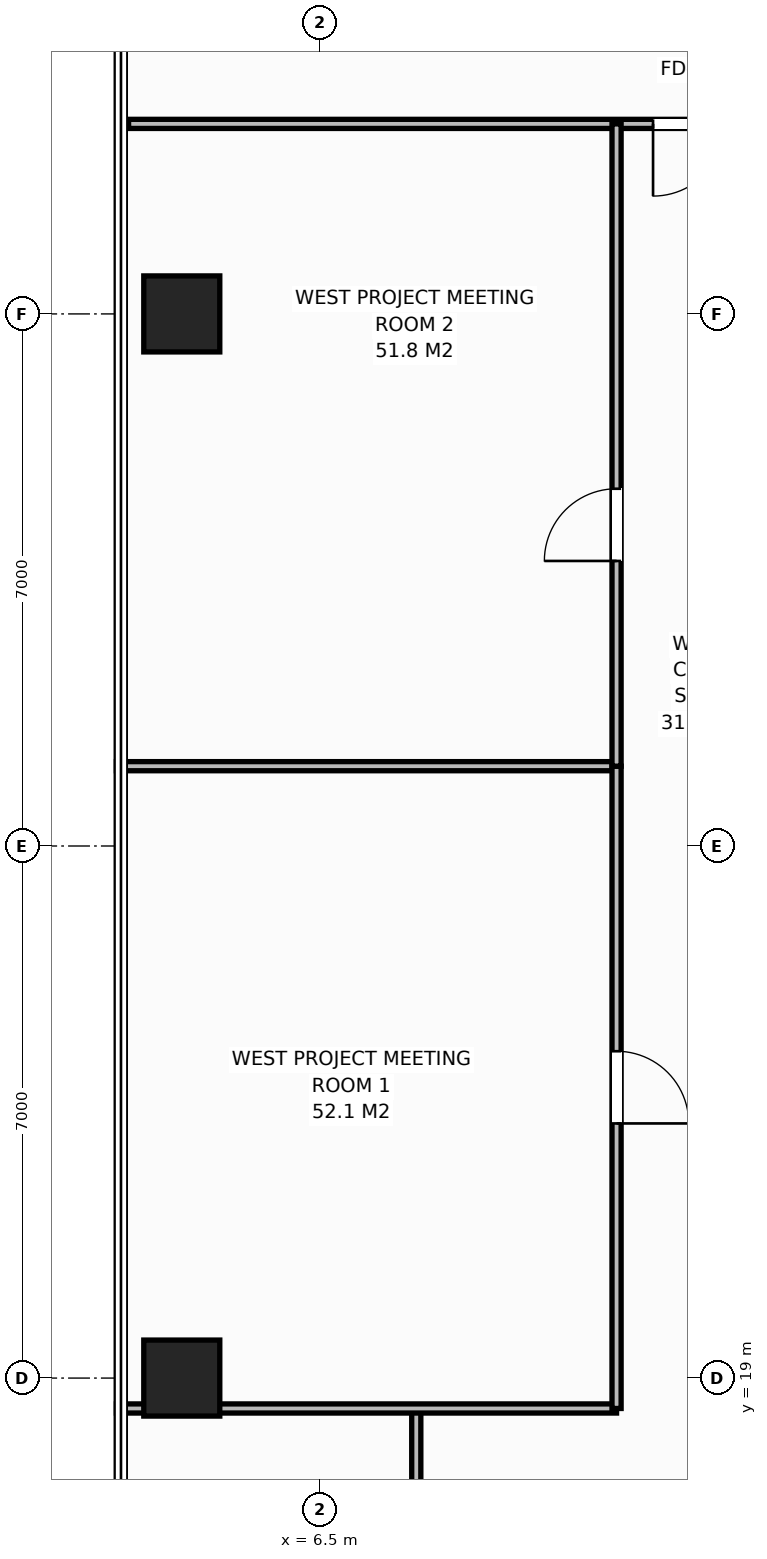
"""IFC4 building model, lengths in metres.
Left out: names, types, materials, properties, quantities, classifications, styles, units other than length and angle.
Written with IfcOpenShell. Run it as: python <this file> out.ifc"""

import sys

from ifc_helpers import new_model, si_unit, direction, frame, frame_2d, origin, origin_2d, place, context, subcontext, project, spatial, rectangle, extrude, element, fill, save


model = new_model("IFC4")
c1 = context("Model", 3, precision=1e-05, world=origin(), true_north=direction((0.0, 1.0)))
c2 = subcontext(c1, "Body", "Model", "MODEL_VIEW")
j1 = project(units=[si_unit("LENGTHUNIT", "METRE"), si_unit("PLANEANGLEUNIT", "RADIAN")], contexts=[c1])
p1 = place(None, origin())
s1 = spatial("IfcSite", under=j1, at=p1, CompositionType="ELEMENT")
p2 = place(p1, origin())
s2 = spatial("IfcBuilding", under=s1, at=p2, CompositionType="ELEMENT")
p3 = place(p2, frame((0.0, 0.0, 182.2)))
s3 = spatial("IfcBuildingStorey", under=s2, at=p3, CompositionType="ELEMENT", Elevation=182.2)
for number, where, z_axis, x_axis in (
    (1, (4.68, 19.0, 0.0), (0.0, 0.0, 1.0), (1.0, 0.0, 0.0)),
    (2, (4.68, 33.0, 0.0), (0.0, 0.0, 1.0), (1.0, 0.0, 0.0)),
):
    element("IfcColumn", number, at=place(p3, frame(where, z_axis=z_axis, x_axis=x_axis)), inside=s3, PredefinedType="COLUMN", context=c2, shape_type="SweptSolid", body=[
        extrude(rectangle(XDim=1.0, YDim=1.0, at=origin_2d()), origin(), (0.0, 0.0, 1.0), 3.8),
    ])
p4 = place(p3, frame((7.765, 16.5, 0.0), z_axis=(0.0, 0.0, 1.0), x_axis=(0.0, 1.0, 0.0)))
e3 = element("IfcWall", 3, at=p4, inside=s3, PredefinedType="PARTITIONING", context=c2, shape_type="SweptSolid", body=[
    extrude(rectangle(XDim=2.1, YDim=0.12, at=frame_2d((1.05, 0.0))), origin(), (0.0, 0.0, 1.0), 3.572),
])
p5 = place(p3, frame((3.98, 35.5, 0.0), z_axis=(0.0, 0.0, 1.0), x_axis=(1.0, 0.0, 0.0)))
e4 = element("IfcWall", 4, at=p5, inside=s3, PredefinedType="PARTITIONING", context=c2, shape_type="SweptSolid", body=[
    extrude(rectangle(XDim=9.62, YDim=0.12, at=frame_2d((4.81, 0.0))), origin(), (0.0, 0.0, 1.0), 3.572),
])
p6 = place(p5, frame((6.9, 0.0, 0.0)))
e5 = element("IfcOpeningElement", 5, at=p6, cuts=e4, PredefinedType="OPENING", context=c2, shape_type="SweptSolid", body=[
    extrude(rectangle(XDim=0.95, YDim=2.15, at=frame_2d((0.475, 1.075))), frame((0.0, 0.07, 0.0), z_axis=(0.0, -1.0, 0.0), x_axis=(1.0, 0.0, 0.0)), (0.0, 0.0, 1.0), 0.14),
])
for number, where, z_axis, x_axis in (
    (6, (3.82, 18.6, 0.0), (0.0, 0.0, 1.0), (1.0, 0.0, 0.0)),
    (7, (3.82, 27.05, 0.0), (0.0, 0.0, 1.0), (1.0, 0.0, 0.0)),
):
    element("IfcWall", number, at=place(p3, frame(where, z_axis=z_axis, x_axis=x_axis)), inside=s3, PredefinedType="PARTITIONING", context=c2, shape_type="SweptSolid", body=[
        extrude(rectangle(XDim=6.58, YDim=0.12, at=frame_2d((3.29, 0.0))), origin(), (0.0, 0.0, 1.0), 3.572),
    ])
p7 = place(p3, frame((10.4, 18.6, 0.0), z_axis=(0.0, 0.0, 1.0), x_axis=(0.0, 1.0, 0.0)))
e8 = element("IfcWall", 8, at=p7, inside=s3, PredefinedType="PARTITIONING", context=c2, shape_type="SweptSolid", body=[
    extrude(rectangle(XDim=8.45, YDim=0.12, at=frame_2d((4.225, 0.0))), origin(), (0.0, 0.0, 1.0), 3.572),
])
p8 = place(p7, frame((3.75, 0.0, 0.0)))
e9 = element("IfcOpeningElement", 9, at=p8, cuts=e8, PredefinedType="OPENING", context=c2, shape_type="SweptSolid", body=[
    extrude(rectangle(XDim=0.95, YDim=2.15, at=frame_2d((0.475, 1.075))), frame((0.0, 0.07, 0.0), z_axis=(0.0, -1.0, 0.0), x_axis=(1.0, 0.0, 0.0)), (0.0, 0.0, 1.0), 0.14),
])
p9 = place(p3, frame((10.4, 27.05, 0.0), z_axis=(0.0, 0.0, 1.0), x_axis=(0.0, 1.0, 0.0)))
e10 = element("IfcWall", 10, at=p9, inside=s3, PredefinedType="PARTITIONING", context=c2, shape_type="SweptSolid", body=[
    extrude(rectangle(XDim=8.45, YDim=0.12, at=frame_2d((4.225, 0.0))), origin(), (0.0, 0.0, 1.0), 3.572),
])
p10 = place(p9, frame((2.7, 0.0, 0.0)))
e11 = element("IfcOpeningElement", 11, at=p10, cuts=e10, PredefinedType="OPENING", context=c2, shape_type="SweptSolid", body=[
    extrude(rectangle(XDim=0.95, YDim=2.15, at=frame_2d((0.475, 1.075))), frame((0.0, 0.07, 0.0), z_axis=(0.0, -1.0, 0.0), x_axis=(1.0, 0.0, 0.0)), (0.0, 0.0, 1.0), 0.14),
])
p11 = place(p6, origin())
e12 = element("IfcDoor", 12, at=p11, inside=s3, OperationType="SINGLE_SWING_RIGHT", PredefinedType="DOOR", context=c2, shape_type="SweptSolid", body=[
    extrude(rectangle(XDim=0.95, YDim=2.15, at=frame_2d((0.475, 1.075))), frame((0.0, 0.025, 0.0), z_axis=(0.0, -1.0, 0.0), x_axis=(1.0, 0.0, 0.0)), (0.0, 0.0, 1.0), 0.05),
])
fill(e5, e12)
p12 = place(p8, origin())
e13 = element("IfcDoor", 13, at=p12, inside=s3, OperationType="SINGLE_SWING_RIGHT", PredefinedType="DOOR", context=c2, shape_type="SweptSolid", body=[
    extrude(rectangle(XDim=0.95, YDim=2.15, at=frame_2d((0.475, 1.075))), frame((0.0, 0.025, 0.0), z_axis=(0.0, -1.0, 0.0), x_axis=(1.0, 0.0, 0.0)), (0.0, 0.0, 1.0), 0.05),
])
fill(e9, e13)
p13 = place(p10, origin())
e14 = element("IfcDoor", 14, at=p13, inside=s3, OperationType="SINGLE_SWING_LEFT", PredefinedType="DOOR", context=c2, shape_type="SweptSolid", body=[
    extrude(rectangle(XDim=0.95, YDim=2.15, at=frame_2d((0.475, 1.075))), frame((0.0, 0.025, 0.0), z_axis=(0.0, -1.0, 0.0), x_axis=(1.0, 0.0, 0.0)), (0.0, 0.0, 1.0), 0.05),
])
fill(e11, e14)
save(model, sys.argv[1])
